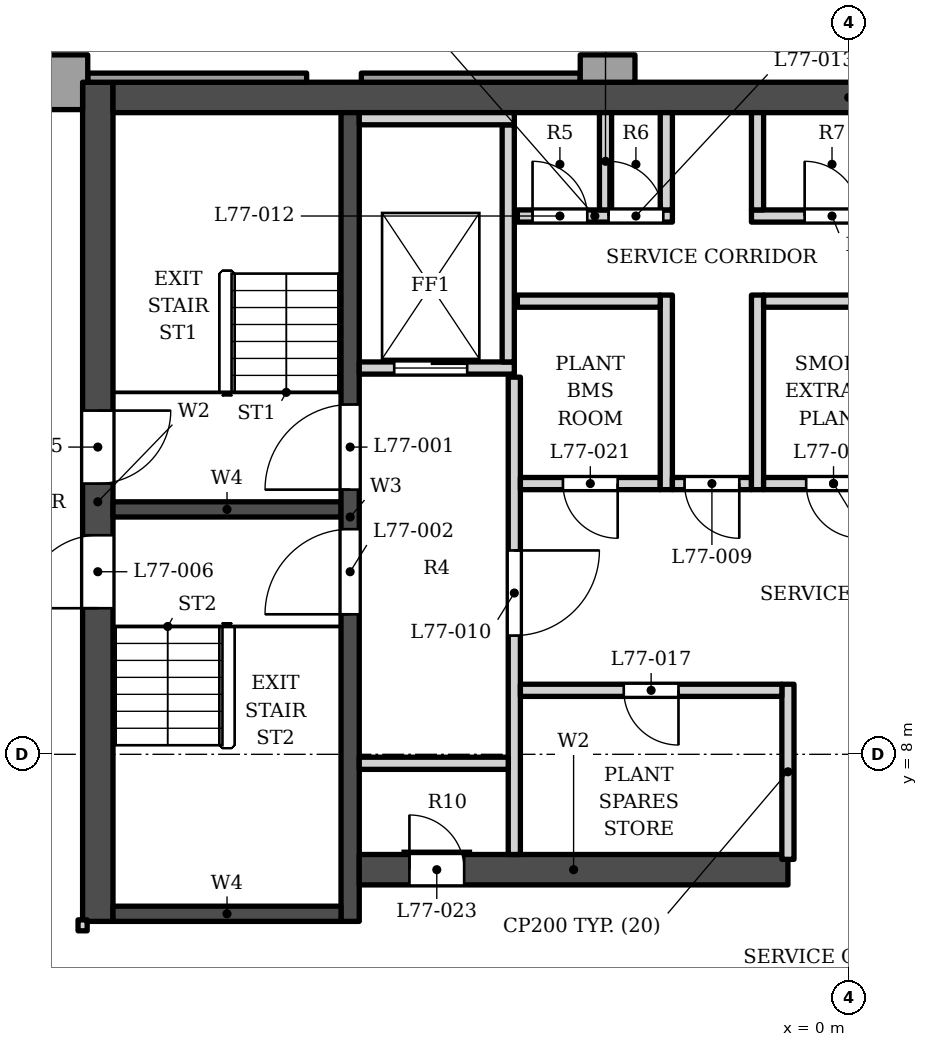
"""IFC4 building model, lengths in metres.
Left out: names, types, materials, properties, quantities, classifications, styles, units other than length and angle.
Written with IfcOpenShell. Run it as: python <this file> out.ifc"""

import sys

from ifc_helpers import new_model, si_unit, direction, frame, frame_2d, origin, place, context, subcontext, project, spatial, polyline, rectangle, outline, extrude, element, fill, save


model = new_model("IFC4")
c1 = context("Model", 3, precision=1e-05, world=origin(), true_north=direction((0.0, 1.0)))
c2 = subcontext(c1, "Body", "Model", "MODEL_VIEW")
j1 = project(units=[si_unit("LENGTHUNIT", "METRE"), si_unit("PLANEANGLEUNIT", "RADIAN")], contexts=[c1])
p1 = place(None, origin())
s1 = spatial("IfcSite", under=j1, at=p1, CompositionType="ELEMENT")
p2 = place(p1, origin())
s2 = spatial("IfcBuilding", under=s1, at=p2, CompositionType="ELEMENT")
p3 = place(p2, frame((0.0, 0.0, 330.5)))
s3 = spatial("IfcBuildingStorey", under=s2, at=p3, CompositionType="ELEMENT", Elevation=330.5)
p4 = place(p3, frame((-12.1, 18.802, 0.0), z_axis=(0.0, 0.0, 1.0), x_axis=(1.0, 0.0, 0.0)))
e1 = element("IfcWall", 1, at=p4, inside=s3, PredefinedType="SHEAR", context=c2, shape_type="SweptSolid", body=[
    extrude(rectangle(XDim=24.2, YDim=0.5, at=frame_2d((12.1, 0.0))), origin(), (0.0, 0.0, 1.0), 5.0),
])
p5 = place(p3, frame((-12.35, 5.253, 0.0), z_axis=(0.0, 0.0, 1.0), x_axis=(0.0, 1.0, 0.0)))
e2 = element("IfcWall", 2, at=p5, inside=s3, PredefinedType="SHEAR", context=c2, shape_type="SweptSolid", body=[
    extrude(rectangle(XDim=13.8, YDim=0.5, at=frame_2d((6.9, 0.0))), origin(), (0.0, 0.0, 1.0), 5.0),
])
p6 = place(p5, frame((7.2, 0.0, 0.0)))
e3 = element("IfcOpeningElement", 3, at=p6, cuts=e2, PredefinedType="OPENING", context=c2, shape_type="SweptSolid", body=[
    extrude(rectangle(XDim=1.2, YDim=2.1, at=frame_2d((0.6, 1.05))), frame((0.0, 0.26, 0.0), z_axis=(0.0, -1.0, 0.0), x_axis=(1.0, 0.0, 0.0)), (0.0, 0.0, 1.0), 0.52),
])
p7 = place(p5, frame((5.15, 0.0, 0.0)))
e4 = element("IfcOpeningElement", 4, at=p7, cuts=e2, PredefinedType="OPENING", context=c2, shape_type="SweptSolid", body=[
    extrude(rectangle(XDim=1.2, YDim=2.1, at=frame_2d((0.6, 1.05))), frame((0.0, 0.26, 0.0), z_axis=(0.0, -1.0, 0.0), x_axis=(1.0, 0.0, 0.0)), (0.0, 0.0, 1.0), 0.52),
])
p8 = place(p3, frame((-8.2, 5.253, 0.0), z_axis=(0.0, 0.0, 1.0), x_axis=(0.0, 1.0, 0.0)))
e5 = element("IfcWall", 5, at=p8, inside=s3, PredefinedType="SHEAR", context=c2, shape_type="SweptSolid", body=[
    extrude(rectangle(XDim=13.3, YDim=0.3, at=frame_2d((6.65, 0.0))), origin(), (0.0, 0.0, 1.0), 5.0),
])
p9 = place(p8, frame((7.1, 0.0, 0.0)))
e6 = element("IfcOpeningElement", 6, at=p9, cuts=e5, PredefinedType="OPENING", context=c2, shape_type="SweptSolid", body=[
    extrude(rectangle(XDim=1.4, YDim=2.1, at=frame_2d((0.7, 1.05))), frame((0.0, 0.16, 0.0), z_axis=(0.0, -1.0, 0.0), x_axis=(1.0, 0.0, 0.0)), (0.0, 0.0, 1.0), 0.32),
])
p10 = place(p8, frame((5.05, 0.0, 0.0)))
e7 = element("IfcOpeningElement", 7, at=p10, cuts=e5, PredefinedType="OPENING", context=c2, shape_type="SweptSolid", body=[
    extrude(rectangle(XDim=1.4, YDim=2.1, at=frame_2d((0.7, 1.05))), frame((0.0, 0.16, 0.0), z_axis=(0.0, -1.0, 0.0), x_axis=(1.0, 0.0, 0.0)), (0.0, 0.0, 1.0), 0.32),
])
for number, where, z_axis, x_axis in (
    (8, (-12.1, 12.028, 0.0), (0.0, 0.0, 1.0), (1.0, 0.0, 0.0)),
    (9, (-12.1, 5.378, 0.0), (0.0, 0.0, 1.0), (1.0, 0.0, 0.0)),
):
    element("IfcWall", number, at=place(p3, frame(where, z_axis=z_axis, x_axis=x_axis)), inside=s3, PredefinedType="SHEAR", context=c2, shape_type="SweptSolid", body=[
        extrude(rectangle(XDim=3.75, YDim=0.25, at=frame_2d((1.875, 0.0))), origin(), (0.0, 0.0, 1.0), 5.0),
    ])
p11 = place(p3, frame((-8.05, 6.103, 0.0), z_axis=(0.0, 0.0, 1.0), x_axis=(1.0, 0.0, 0.0)))
e10 = element("IfcWall", 10, at=p11, inside=s3, PredefinedType="SHEAR", context=c2, shape_type="SweptSolid", body=[
    extrude(rectangle(XDim=7.05, YDim=0.5, at=frame_2d((3.525, 0.0))), origin(), (0.0, 0.0, 1.0), 5.0),
])
p12 = place(p11, frame((0.825, 0.0, 0.0)))
e11 = element("IfcOpeningElement", 11, at=p12, cuts=e10, PredefinedType="OPENING", context=c2, shape_type="SweptSolid", body=[
    extrude(rectangle(XDim=0.9, YDim=2.1, at=frame_2d((0.45, 1.05))), frame((0.0, 0.26, 0.0), z_axis=(0.0, -1.0, 0.0), x_axis=(1.0, 0.0, 0.0)), (0.0, 0.0, 1.0), 0.52),
])
p13 = place(p3, origin())
e12 = element("IfcWall", 12, at=p13, inside=s3, PredefinedType="SOLIDWALL", context=c2, shape_type="SweptSolid", body=[
    extrude(outline(polyline([(-4.416, 19.502), (-4.416, 19.052), (-3.516, 19.052), (-3.516, 19.502), (-4.416, 19.502)])), origin(), (0.0, 0.0, 1.0), 3.8),
])
p14 = place(p3, origin())
e13 = element("IfcWall", 13, at=p14, inside=s3, PredefinedType="SOLIDWALL", context=c2, shape_type="SweptSolid", body=[
    extrude(outline(polyline([(-13.416, 19.502), (-13.416, 18.603), (-12.6, 18.603), (-12.6, 19.052), (-12.516, 19.052), (-12.516, 19.502), (-13.416, 19.502)])), origin(), (0.0, 0.0, 1.0), 3.8),
])
p15 = place(p3, origin())
e14 = element("IfcWall", 14, at=p15, inside=s3, PredefinedType="ELEMENTEDWALL", context=c2, shape_type="SweptSolid", body=[
    extrude(outline(polyline([(-4.416, 19.203), (-8.016, 19.203), (-8.016, 19.052), (-4.416, 19.052), (-4.416, 19.203)])), origin(), (0.0, 0.0, 1.0), 3.8),
])
p16 = place(p3, origin())
e15 = element("IfcWall", 15, at=p16, inside=s3, PredefinedType="ELEMENTEDWALL", context=c2, shape_type="SweptSolid", body=[
    extrude(outline(polyline([(-8.916, 19.203), (-12.516, 19.203), (-12.516, 19.052), (-8.916, 19.052), (-8.916, 19.203)])), origin(), (0.0, 0.0, 1.0), 3.8),
])
p17 = place(p3, frame((-1.0, 6.273, 0.0), z_axis=(0.0, 0.0, 1.0), x_axis=(0.0, 1.0, 0.0)))
e16 = element("IfcWall", 16, at=p17, inside=s3, PredefinedType="PARTITIONING", context=c2, shape_type="SweptSolid", body=[
    extrude(rectangle(XDim=2.88, YDim=0.2, at=frame_2d((1.44, 0.0))), origin(), (0.0, 0.0, 1.0), 4.8),
])
p18 = place(p3, frame((-5.5, 6.353, 0.0), z_axis=(0.0, 0.0, 1.0), x_axis=(0.0, 1.0, 0.0)))
e17 = element("IfcWall", 17, at=p18, inside=s3, PredefinedType="SOLIDWALL", context=c2, shape_type="SweptSolid", body=[
    extrude(rectangle(XDim=7.85, YDim=0.2, at=frame_2d((3.925, 0.0))), origin(), (0.0, 0.0, 1.0), 4.8),
])
p19 = place(p18, frame((3.6, 0.0, 0.0)))
e18 = element("IfcOpeningElement", 18, at=p19, cuts=e17, PredefinedType="OPENING", context=c2, shape_type="SweptSolid", body=[
    extrude(rectangle(XDim=1.4, YDim=2.1, at=frame_2d((0.7, 1.05))), frame((0.0, 0.11, 0.0), z_axis=(0.0, -1.0, 0.0), x_axis=(1.0, 0.0, 0.0)), (0.0, 0.0, 1.0), 0.22),
])
p20 = place(p3, frame((-8.05, 7.853, 0.0), z_axis=(0.0, 0.0, 1.0), x_axis=(1.0, 0.0, 0.0)))
e19 = element("IfcWall", 19, at=p20, inside=s3, PredefinedType="SOLIDWALL", context=c2, shape_type="SweptSolid", body=[
    extrude(rectangle(XDim=2.45, YDim=0.2, at=frame_2d((1.225, 0.0))), origin(), (0.0, 0.0, 1.0), 4.8),
])
p21 = place(p3, frame((-5.4, 9.052, 0.0), z_axis=(0.0, 0.0, 1.0), x_axis=(1.0, 0.0, 0.0)))
e20 = element("IfcWall", 20, at=p21, inside=s3, PredefinedType="PARTITIONING", context=c2, shape_type="SweptSolid", body=[
    extrude(rectangle(XDim=4.3, YDim=0.2, at=frame_2d((2.15, 0.0))), origin(), (0.0, 0.0, 1.0), 4.8),
])
p22 = place(p21, frame((1.7, 0.0, 0.0)))
e21 = element("IfcOpeningElement", 21, at=p22, cuts=e20, PredefinedType="OPENING", context=c2, shape_type="SweptSolid", body=[
    extrude(rectangle(XDim=0.9, YDim=2.1, at=frame_2d((0.45, 1.05))), frame((0.0, 0.11, 0.0), z_axis=(0.0, -1.0, 0.0), x_axis=(1.0, 0.0, 0.0)), (0.0, 0.0, 1.0), 0.22),
])
p23 = place(p3, frame((-5.4, 12.453, 0.0), z_axis=(0.0, 0.0, 1.0), x_axis=(1.0, 0.0, 0.0)))
e22 = element("IfcWall", 22, at=p23, inside=s3, PredefinedType="PARTITIONING", context=c2, shape_type="SweptSolid", body=[
    extrude(rectangle(XDim=2.3, YDim=0.2, at=frame_2d((1.15, 0.0))), origin(), (0.0, 0.0, 1.0), 4.8),
])
p24 = place(p23, frame((0.7, 0.0, 0.0)))
e23 = element("IfcOpeningElement", 23, at=p24, cuts=e22, PredefinedType="OPENING", context=c2, shape_type="SweptSolid", body=[
    extrude(rectangle(XDim=0.9, YDim=2.1, at=frame_2d((0.45, 1.05))), frame((0.0, 0.11, 0.0), z_axis=(0.0, -1.0, 0.0), x_axis=(1.0, 0.0, 0.0)), (0.0, 0.0, 1.0), 0.22),
])
p25 = place(p3, frame((-3.0, 12.353, 0.0), z_axis=(0.0, 0.0, 1.0), x_axis=(0.0, 1.0, 0.0)))
e24 = element("IfcWall", 24, at=p25, inside=s3, PredefinedType="PARTITIONING", context=c2, shape_type="SweptSolid", body=[
    extrude(rectangle(XDim=3.2, YDim=0.2, at=frame_2d((1.6, 0.0))), origin(), (0.0, 0.0, 1.0), 4.8),
])
p26 = place(p3, frame((-2.9, 12.453, 0.0), z_axis=(0.0, 0.0, 1.0), x_axis=(1.0, 0.0, 0.0)))
e25 = element("IfcWall", 25, at=p26, inside=s3, PredefinedType="PARTITIONING", context=c2, shape_type="SweptSolid", body=[
    extrude(rectangle(XDim=1.3, YDim=0.2, at=frame_2d((0.65, 0.0))), origin(), (0.0, 0.0, 1.0), 4.8),
])
p27 = place(p26, frame((0.2, 0.0, 0.0)))
e26 = element("IfcOpeningElement", 26, at=p27, cuts=e25, PredefinedType="OPENING", context=c2, shape_type="SweptSolid", body=[
    extrude(rectangle(XDim=0.9, YDim=2.1, at=frame_2d((0.45, 1.05))), frame((0.0, 0.11, 0.0), z_axis=(0.0, -1.0, 0.0), x_axis=(1.0, 0.0, 0.0)), (0.0, 0.0, 1.0), 0.22),
])
p28 = place(p3, frame((-1.5, 12.353, 0.0), z_axis=(0.0, 0.0, 1.0), x_axis=(0.0, 1.0, 0.0)))
e27 = element("IfcWall", 27, at=p28, inside=s3, PredefinedType="PARTITIONING", context=c2, shape_type="SweptSolid", body=[
    extrude(rectangle(XDim=3.2, YDim=0.2, at=frame_2d((1.6, 0.0))), origin(), (0.0, 0.0, 1.0), 4.8),
])
p29 = place(p3, frame((-1.4, 12.453, 0.0), z_axis=(0.0, 0.0, 1.0), x_axis=(1.0, 0.0, 0.0)))
e28 = element("IfcWall", 28, at=p29, inside=s3, PredefinedType="PARTITIONING", context=c2, shape_type="SweptSolid", body=[
    extrude(rectangle(XDim=2.3, YDim=0.2, at=frame_2d((1.15, 0.0))), origin(), (0.0, 0.0, 1.0), 4.8),
])
p30 = place(p29, frame((0.7, 0.0, 0.0)))
e29 = element("IfcOpeningElement", 29, at=p30, cuts=e28, PredefinedType="OPENING", context=c2, shape_type="SweptSolid", body=[
    extrude(rectangle(XDim=0.9, YDim=2.1, at=frame_2d((0.45, 1.05))), frame((0.0, 0.11, 0.0), z_axis=(0.0, -1.0, 0.0), x_axis=(1.0, 0.0, 0.0)), (0.0, 0.0, 1.0), 0.22),
])
p31 = place(p3, frame((-8.05, 14.353, 0.0), z_axis=(0.0, 0.0, 1.0), x_axis=(1.0, 0.0, 0.0)))
e30 = element("IfcWall", 30, at=p31, inside=s3, PredefinedType="SOLIDWALL", context=c2, shape_type="SweptSolid", body=[
    extrude(rectangle(XDim=2.55, YDim=0.2, at=frame_2d((1.275, 0.0))), origin(), (0.0, 0.0, 1.0), 4.8),
])
p32 = place(p31, frame((0.575, 0.0, 0.0)))
e31 = element("IfcOpeningElement", 31, at=p32, cuts=e30, PredefinedType="OPENING", context=c2, shape_type="SweptSolid", body=[
    extrude(rectangle(XDim=1.2, YDim=2.1, at=frame_2d((0.6, 1.05))), frame((0.0, 0.11, 0.0), z_axis=(0.0, -1.0, 0.0), x_axis=(1.0, 0.0, 0.0)), (0.0, 0.0, 1.0), 0.22),
])
p33 = place(p3, frame((-5.6, 14.453, 0.0), z_axis=(0.0, 0.0, 1.0), x_axis=(0.0, 1.0, 0.0)))
e32 = element("IfcWall", 32, at=p33, inside=s3, PredefinedType="SOLIDWALL", context=c2, shape_type="SweptSolid", body=[
    extrude(rectangle(XDim=3.9, YDim=0.2, at=frame_2d((1.95, 0.0))), origin(), (0.0, 0.0, 1.0), 4.8),
])
p34 = place(p3, frame((-5.45, 15.453, 0.0), z_axis=(0.0, 0.0, 1.0), x_axis=(1.0, 0.0, 0.0)))
e33 = element("IfcWall", 33, at=p34, inside=s3, PredefinedType="SOLIDWALL", context=c2, shape_type="SweptSolid", body=[
    extrude(rectangle(XDim=2.35, YDim=0.2, at=frame_2d((1.175, 0.0))), origin(), (0.0, 0.0, 1.0), 4.8),
])
p35 = place(p3, frame((-1.4, 15.453, 0.0), z_axis=(0.0, 0.0, 1.0), x_axis=(1.0, 0.0, 0.0)))
e34 = element("IfcWall", 34, at=p35, inside=s3, PredefinedType="PARTITIONING", context=c2, shape_type="SweptSolid", body=[
    extrude(rectangle(XDim=2.3, YDim=0.2, at=frame_2d((1.15, 0.0))), origin(), (0.0, 0.0, 1.0), 4.8),
])
p36 = place(p3, frame((-5.45, 16.853, 0.0), z_axis=(0.0, 0.0, 1.0), x_axis=(1.0, 0.0, 0.0)))
e35 = element("IfcWall", 35, at=p36, inside=s3, PredefinedType="SOLIDWALL", context=c2, shape_type="SweptSolid", body=[
    extrude(rectangle(XDim=2.55, YDim=0.2, at=frame_2d((1.275, 0.0))), origin(), (0.0, 0.0, 1.0), 4.8),
])
p37 = place(p36, frame((0.25, 0.0, 0.0)))
e36 = element("IfcOpeningElement", 36, at=p37, cuts=e35, PredefinedType="OPENING", context=c2, shape_type="SweptSolid", body=[
    extrude(rectangle(XDim=0.9, YDim=2.1, at=frame_2d((0.45, 1.05))), frame((0.0, 0.11, 0.0), z_axis=(0.0, -1.0, 0.0), x_axis=(1.0, 0.0, 0.0)), (0.0, 0.0, 1.0), 0.22),
])
p38 = place(p36, frame((1.5, 0.0, 0.0)))
e37 = element("IfcOpeningElement", 37, at=p38, cuts=e35, PredefinedType="OPENING", context=c2, shape_type="SweptSolid", body=[
    extrude(rectangle(XDim=0.9, YDim=2.1, at=frame_2d((0.45, 1.05))), frame((0.0, 0.11, 0.0), z_axis=(0.0, -1.0, 0.0), x_axis=(1.0, 0.0, 0.0)), (0.0, 0.0, 1.0), 0.22),
])
p39 = place(p3, frame((-1.6, 16.853, 0.0), z_axis=(0.0, 0.0, 1.0), x_axis=(1.0, 0.0, 0.0)))
e38 = element("IfcWall", 38, at=p39, inside=s3, PredefinedType="SOLIDWALL", context=c2, shape_type="SweptSolid", body=[
    extrude(rectangle(XDim=7.05, YDim=0.2, at=frame_2d((3.525, 0.0))), origin(), (0.0, 0.0, 1.0), 4.8),
])
p40 = place(p39, frame((0.875, 0.0, 0.0)))
e39 = element("IfcOpeningElement", 39, at=p40, cuts=e38, PredefinedType="OPENING", context=c2, shape_type="SweptSolid", body=[
    extrude(rectangle(XDim=0.9, YDim=2.1, at=frame_2d((0.45, 1.05))), frame((0.0, 0.11, 0.0), z_axis=(0.0, -1.0, 0.0), x_axis=(1.0, 0.0, 0.0)), (0.0, 0.0, 1.0), 0.22),
])
p41 = place(p39, frame((3.325, 0.0, 0.0)))
e40 = element("IfcOpeningElement", 40, at=p41, cuts=e38, PredefinedType="OPENING", context=c2, shape_type="SweptSolid", body=[
    extrude(rectangle(XDim=0.9, YDim=2.1, at=frame_2d((0.45, 1.05))), frame((0.0, 0.11, 0.0), z_axis=(0.0, -1.0, 0.0), x_axis=(1.0, 0.0, 0.0)), (0.0, 0.0, 1.0), 0.22),
])
p42 = place(p39, frame((5.6, 0.0, 0.0)))
e41 = element("IfcOpeningElement", 41, at=p42, cuts=e38, PredefinedType="OPENING", context=c2, shape_type="SweptSolid", body=[
    extrude(rectangle(XDim=0.9, YDim=2.1, at=frame_2d((0.45, 1.05))), frame((0.0, 0.11, 0.0), z_axis=(0.0, -1.0, 0.0), x_axis=(1.0, 0.0, 0.0)), (0.0, 0.0, 1.0), 0.22),
])
for number, where, z_axis, x_axis in (
    (42, (-4.0, 16.953, 0.0), (0.0, 0.0, 1.0), (0.0, 1.0, 0.0)),
    (43, (-3.0, 16.953, 0.0), (0.0, 0.0, 1.0), (0.0, 1.0, 0.0)),
    (44, (-1.5, 16.953, 0.0), (0.0, 0.0, 1.0), (0.0, 1.0, 0.0)),
):
    element("IfcWall", number, at=place(p3, frame(where, z_axis=z_axis, x_axis=x_axis)), inside=s3, PredefinedType="PARTITIONING", context=c2, shape_type="SweptSolid", body=[
        extrude(rectangle(XDim=1.6, YDim=0.2, at=frame_2d((0.8, 0.0))), origin(), (0.0, 0.0, 1.0), 4.8),
    ])
p43 = place(p3, frame((-8.05, 18.453, 0.0), z_axis=(0.0, 0.0, 1.0), x_axis=(1.0, 0.0, 0.0)))
e45 = element("IfcWall", 45, at=p43, inside=s3, PredefinedType="SOLIDWALL", context=c2, shape_type="SweptSolid", body=[
    extrude(rectangle(XDim=2.55, YDim=0.2, at=frame_2d((1.275, 0.0))), origin(), (0.0, 0.0, 1.0), 4.8),
])
p44 = place(p3, frame((-12.6, 5.098, 0.0), z_axis=(0.0, 0.0, 1.0), x_axis=(0.0, 1.0, 0.0)))
e46 = element("IfcWall", 46, at=p44, inside=s3, PredefinedType="PARTITIONING", context=c2, shape_type="SweptSolid", body=[
    extrude(rectangle(XDim=0.18, YDim=0.15, at=frame_2d((0.09, 0.0))), origin(), (0.0, 0.0, 1.0), 4.8),
])
p45 = place(p32, origin())
e47 = element("IfcDoor", 47, at=p45, inside=s3, OperationType="DOUBLE_DOOR_SLIDING", PredefinedType="DOOR", context=c2, shape_type="SweptSolid", body=[
    extrude(rectangle(XDim=1.2, YDim=2.1, at=frame_2d((0.6, 1.05))), frame((0.0, 0.025, 0.0), z_axis=(0.0, -1.0, 0.0), x_axis=(1.0, 0.0, 0.0)), (0.0, 0.0, 1.0), 0.05),
])
fill(e31, e47)
p46 = place(p9, origin())
e48 = element("IfcDoor", 48, at=p46, inside=s3, OperationType="SINGLE_SWING_LEFT", PredefinedType="DOOR", context=c2, shape_type="SweptSolid", body=[
    extrude(rectangle(XDim=1.4, YDim=2.1, at=frame_2d((0.7, 1.05))), frame((0.0, 0.025, 0.0), z_axis=(0.0, -1.0, 0.0), x_axis=(1.0, 0.0, 0.0)), (0.0, 0.0, 1.0), 0.05),
])
fill(e6, e48)
p47 = place(p10, origin())
e49 = element("IfcDoor", 49, at=p47, inside=s3, OperationType="SINGLE_SWING_LEFT", PredefinedType="DOOR", context=c2, shape_type="SweptSolid", body=[
    extrude(rectangle(XDim=1.4, YDim=2.1, at=frame_2d((0.7, 1.05))), frame((0.0, 0.025, 0.0), z_axis=(0.0, -1.0, 0.0), x_axis=(1.0, 0.0, 0.0)), (0.0, 0.0, 1.0), 0.05),
])
fill(e7, e49)
p48 = place(p6, origin())
e50 = element("IfcDoor", 50, at=p48, inside=s3, OperationType="SINGLE_SWING_RIGHT", PredefinedType="DOOR", context=c2, shape_type="SweptSolid", body=[
    extrude(rectangle(XDim=1.2, YDim=2.1, at=frame_2d((0.6, 1.05))), frame((0.0, 0.025, 0.0), z_axis=(0.0, -1.0, 0.0), x_axis=(1.0, 0.0, 0.0)), (0.0, 0.0, 1.0), 0.05),
])
fill(e3, e50)
p49 = place(p7, origin())
e51 = element("IfcDoor", 51, at=p49, inside=s3, OperationType="SINGLE_SWING_LEFT", PredefinedType="DOOR", context=c2, shape_type="SweptSolid", body=[
    extrude(rectangle(XDim=1.2, YDim=2.1, at=frame_2d((0.6, 1.05))), frame((0.0, 0.025, 0.0), z_axis=(0.0, -1.0, 0.0), x_axis=(1.0, 0.0, 0.0)), (0.0, 0.0, 1.0), 0.05),
])
fill(e4, e51)
p50 = place(p27, origin())
e52 = element("IfcDoor", 52, at=p50, inside=s3, OperationType="SINGLE_SWING_RIGHT", PredefinedType="DOOR", context=c2, shape_type="SweptSolid", body=[
    extrude(rectangle(XDim=0.9, YDim=2.1, at=frame_2d((0.45, 1.05))), frame((0.0, 0.025, 0.0), z_axis=(0.0, -1.0, 0.0), x_axis=(1.0, 0.0, 0.0)), (0.0, 0.0, 1.0), 0.05),
])
fill(e26, e52)
p51 = place(p19, origin())
e53 = element("IfcDoor", 53, at=p51, inside=s3, OperationType="SINGLE_SWING_RIGHT", PredefinedType="DOOR", context=c2, shape_type="SweptSolid", body=[
    extrude(rectangle(XDim=1.4, YDim=2.1, at=frame_2d((0.7, 1.05))), frame((0.0, 0.025, 0.0), z_axis=(0.0, -1.0, 0.0), x_axis=(1.0, 0.0, 0.0)), (0.0, 0.0, 1.0), 0.05),
])
fill(e18, e53)
p52 = place(p37, origin())
e54 = element("IfcDoor", 54, at=p52, inside=s3, OperationType="SINGLE_SWING_LEFT", PredefinedType="DOOR", context=c2, shape_type="SweptSolid", body=[
    extrude(rectangle(XDim=0.9, YDim=2.1, at=frame_2d((0.45, 1.05))), frame((0.0, 0.025, 0.0), z_axis=(0.0, -1.0, 0.0), x_axis=(1.0, 0.0, 0.0)), (0.0, 0.0, 1.0), 0.05),
])
fill(e36, e54)
p53 = place(p38, origin())
e55 = element("IfcDoor", 55, at=p53, inside=s3, OperationType="SINGLE_SWING_LEFT", PredefinedType="DOOR", context=c2, shape_type="SweptSolid", body=[
    extrude(rectangle(XDim=0.9, YDim=2.1, at=frame_2d((0.45, 1.05))), frame((0.0, 0.025, 0.0), z_axis=(0.0, -1.0, 0.0), x_axis=(1.0, 0.0, 0.0)), (0.0, 0.0, 1.0), 0.05),
])
fill(e37, e55)
p54 = place(p40, origin())
e56 = element("IfcDoor", 56, at=p54, inside=s3, OperationType="SINGLE_SWING_LEFT", PredefinedType="DOOR", context=c2, shape_type="SweptSolid", body=[
    extrude(rectangle(XDim=0.9, YDim=2.1, at=frame_2d((0.45, 1.05))), frame((0.0, 0.025, 0.0), z_axis=(0.0, -1.0, 0.0), x_axis=(1.0, 0.0, 0.0)), (0.0, 0.0, 1.0), 0.05),
])
fill(e39, e56)
p55 = place(p22, origin())
e57 = element("IfcDoor", 57, at=p55, inside=s3, OperationType="SINGLE_SWING_RIGHT", PredefinedType="DOOR", context=c2, shape_type="SweptSolid", body=[
    extrude(rectangle(XDim=0.9, YDim=2.1, at=frame_2d((0.45, 1.05))), frame((0.0, 0.025, 0.0), z_axis=(0.0, -1.0, 0.0), x_axis=(1.0, 0.0, 0.0)), (0.0, 0.0, 1.0), 0.05),
])
fill(e21, e57)
p56 = place(p24, origin())
e58 = element("IfcDoor", 58, at=p56, inside=s3, OperationType="SINGLE_SWING_RIGHT", PredefinedType="DOOR", context=c2, shape_type="SweptSolid", body=[
    extrude(rectangle(XDim=0.9, YDim=2.1, at=frame_2d((0.45, 1.05))), frame((0.0, 0.025, 0.0), z_axis=(0.0, -1.0, 0.0), x_axis=(1.0, 0.0, 0.0)), (0.0, 0.0, 1.0), 0.05),
])
fill(e23, e58)
p57 = place(p30, origin())
e59 = element("IfcDoor", 59, at=p57, inside=s3, OperationType="SINGLE_SWING_RIGHT", PredefinedType="DOOR", context=c2, shape_type="SweptSolid", body=[
    extrude(rectangle(XDim=0.9, YDim=2.1, at=frame_2d((0.45, 1.05))), frame((0.0, 0.025, 0.0), z_axis=(0.0, -1.0, 0.0), x_axis=(1.0, 0.0, 0.0)), (0.0, 0.0, 1.0), 0.05),
])
fill(e29, e59)
p58 = place(p12, origin())
e60 = element("IfcDoor", 60, at=p58, inside=s3, OperationType="SINGLE_SWING_LEFT", PredefinedType="DOOR", context=c2, shape_type="SweptSolid", body=[
    extrude(rectangle(XDim=0.9, YDim=2.1, at=frame_2d((0.45, 1.05))), frame((0.0, 0.025, 0.0), z_axis=(0.0, -1.0, 0.0), x_axis=(1.0, 0.0, 0.0)), (0.0, 0.0, 1.0), 0.05),
])
fill(e11, e60)
save(model, sys.argv[1])
